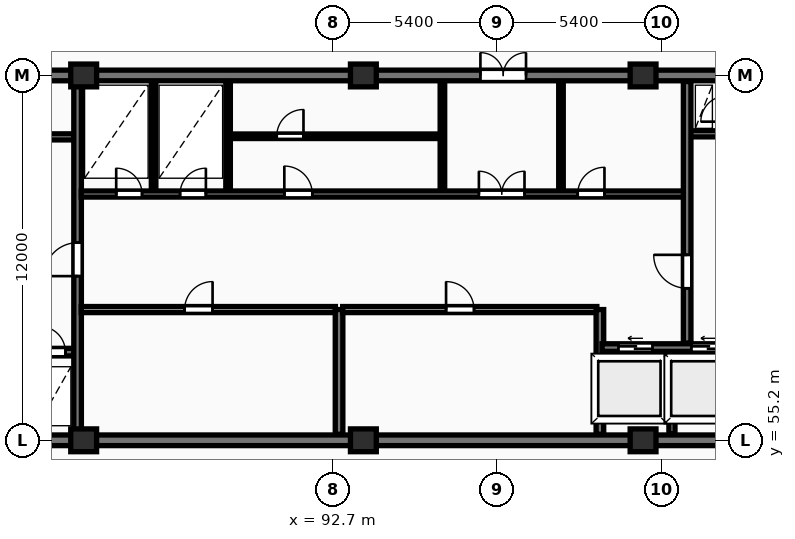
"""IFC4 building model, lengths in metres.
Left out: names, types, materials, properties, quantities, classifications, styles, units other than length and angle.
Written with IfcOpenShell. Run it as: python <this file> out.ifc"""

import sys

from ifc_helpers import new_model, si_unit, direction, frame, frame_2d, origin, origin_2d, place, context, subcontext, project, spatial, rectangle, extrude, element, fill, save


model = new_model("IFC4")
c1 = context("Model", 3, precision=1e-05, world=origin(), true_north=direction((0.0, 1.0)))
c2 = subcontext(c1, "Body", "Model", "MODEL_VIEW")
j1 = project(units=[si_unit("LENGTHUNIT", "METRE"), si_unit("PLANEANGLEUNIT", "RADIAN")], contexts=[c1])
p1 = place(None, origin())
s1 = spatial("IfcSite", under=j1, at=p1, CompositionType="ELEMENT")
p2 = place(p1, origin())
s2 = spatial("IfcBuilding", under=s1, at=p2, CompositionType="ELEMENT")
p3 = place(p2, frame((0.0, 0.0, 204.35)))
s3 = spatial("IfcBuildingStorey", under=s2, at=p3, CompositionType="ELEMENT", Elevation=204.35)
for number, where, z_axis, x_axis in (
    (1, (84.5, 55.2, 0.0), (0.0, 0.0, 1.0), (1.0, 0.0, 0.0)),
    (2, (84.5, 67.2, 0.0), (0.0, 0.0, 1.0), (1.0, 0.0, 0.0)),
    (3, (93.7, 55.2, 0.0), (0.0, 0.0, 1.0), (1.0, 0.0, 0.0)),
    (4, (93.7, 67.2, 0.0), (0.0, 0.0, 1.0), (1.0, 0.0, 0.0)),
    (5, (102.9, 55.2, 0.0), (0.0, 0.0, 1.0), (1.0, 0.0, 0.0)),
    (6, (102.9, 67.2, 0.0), (0.0, 0.0, 1.0), (1.0, 0.0, 0.0)),
):
    element("IfcColumn", number, at=place(p3, frame(where, z_axis=z_axis, x_axis=x_axis)), inside=s3, PredefinedType="COLUMN", context=c2, shape_type="SweptSolid", body=[
        extrude(rectangle(XDim=0.85, YDim=0.75, at=origin_2d()), origin(), (0.0, 0.0, 1.0), 3.25),
    ])
p4 = place(p3, frame((75.95, 55.2, 0.0), z_axis=(0.0, 0.0, 1.0), x_axis=(1.0, 0.0, 0.0)))
e7 = element("IfcWall", 7, at=p4, inside=s3, PredefinedType="SHEAR", context=c2, shape_type="SweptSolid", body=[
    extrude(rectangle(XDim=36.3, YDim=0.35, at=frame_2d((18.15, 0.0))), origin(), (0.0, 0.0, 1.0), 3.25),
])
p5 = place(p3, frame((75.95, 67.2, 0.0), z_axis=(0.0, 0.0, 1.0), x_axis=(1.0, 0.0, 0.0)))
e8 = element("IfcWall", 8, at=p5, inside=s3, PredefinedType="SHEAR", context=c2, shape_type="SweptSolid", body=[
    extrude(rectangle(XDim=36.3, YDim=0.35, at=frame_2d((18.15, 0.0))), origin(), (0.0, 0.0, 1.0), 3.25),
])
p6 = place(p5, frame((5.25, 0.0, 0.0)))
e9 = element("IfcOpeningElement", 9, at=p6, cuts=e8, PredefinedType="OPENING", context=c2, shape_type="SweptSolid", body=[
    extrude(rectangle(XDim=1.0, YDim=2.15, at=frame_2d((0.5, 1.075))), frame((0.0, 0.185, 0.0), z_axis=(0.0, -1.0, 0.0), x_axis=(1.0, 0.0, 0.0)), (0.0, 0.0, 1.0), 0.37),
])
p7 = place(p5, frame((21.6, 0.0, 0.0)))
e10 = element("IfcOpeningElement", 10, at=p7, cuts=e8, PredefinedType="OPENING", context=c2, shape_type="SweptSolid", body=[
    extrude(rectangle(XDim=1.5, YDim=2.2, at=frame_2d((0.75, 1.1))), frame((0.0, 0.185, 0.0), z_axis=(0.0, -1.0, 0.0), x_axis=(1.0, 0.0, 0.0)), (0.0, 0.0, 1.0), 0.37),
])
p8 = place(p5, frame((30.45, 0.0, 0.0)))
e11 = element("IfcOpeningElement", 11, at=p8, cuts=e8, PredefinedType="OPENING", context=c2, shape_type="SweptSolid", body=[
    extrude(rectangle(XDim=1.0, YDim=2.15, at=frame_2d((0.5, 1.075))), frame((0.0, 0.185, 0.0), z_axis=(0.0, -1.0, 0.0), x_axis=(1.0, 0.0, 0.0)), (0.0, 0.0, 1.0), 0.37),
])
p9 = place(p3, frame((79.79, 58.1, 0.0), z_axis=(0.0, 0.0, 1.0), x_axis=(1.0, 0.0, 0.0)))
e12 = element("IfcWall", 12, at=p9, inside=s3, PredefinedType="SHEAR", context=c2, shape_type="SweptSolid", body=[
    extrude(rectangle(XDim=4.39, YDim=0.25, at=frame_2d((2.195, 0.0))), origin(), (0.0, 0.0, 1.0), 3.25),
])
p10 = place(p9, frame((1.05, 0.0, 0.0)))
e13 = element("IfcOpeningElement", 13, at=p10, cuts=e12, PredefinedType="OPENING", context=c2, shape_type="SweptSolid", body=[
    extrude(rectangle(XDim=1.12, YDim=2.12, at=frame_2d((0.56, 1.06))), frame((0.0, 0.135, 0.0), z_axis=(0.0, -1.0, 0.0), x_axis=(1.0, 0.0, 0.0)), (0.0, 0.0, 1.0), 0.27),
])
p11 = place(p9, frame((3.26, 0.0, 0.0)))
e14 = element("IfcOpeningElement", 14, at=p11, cuts=e12, PredefinedType="OPENING", context=c2, shape_type="SweptSolid", body=[
    extrude(rectangle(XDim=0.85, YDim=2.05, at=frame_2d((0.425, 1.025))), frame((0.0, 0.135, 0.0), z_axis=(0.0, -1.0, 0.0), x_axis=(1.0, 0.0, 0.0)), (0.0, 0.0, 1.0), 0.27),
])
p12 = place(p3, frame((79.79, 65.18, 0.0), z_axis=(0.0, 0.0, 1.0), x_axis=(1.0, 0.0, 0.0)))
e15 = element("IfcWall", 15, at=p12, inside=s3, PredefinedType="PARTITIONING", context=c2, shape_type="SweptSolid", body=[
    extrude(rectangle(XDim=4.39, YDim=0.2, at=frame_2d((2.195, 0.0))), origin(), (0.0, 0.0, 1.0), 2.98),
])
p13 = place(p12, frame((1.5, 0.0, 0.0)))
e16 = element("IfcOpeningElement", 16, at=p13, cuts=e15, PredefinedType="OPENING", context=c2, shape_type="SweptSolid", body=[
    extrude(rectangle(XDim=1.1, YDim=2.1, at=frame_2d((0.55, 1.05))), frame((0.0, 0.11, 0.0), z_axis=(0.0, -1.0, 0.0), x_axis=(1.0, 0.0, 0.0)), (0.0, 0.0, 1.0), 0.22),
])
p14 = place(p3, frame((84.3, 55.4, 0.0), z_axis=(0.0, 0.0, 1.0), x_axis=(0.0, 1.0, 0.0)))
e17 = element("IfcWall", 17, at=p14, inside=s3, PredefinedType="SHEAR", context=c2, shape_type="SweptSolid", body=[
    extrude(rectangle(XDim=11.6, YDim=0.25, at=frame_2d((5.8, 0.0))), origin(), (0.0, 0.0, 1.0), 3.25),
])
p15 = place(p14, frame((5.2, 0.0, 0.0)))
e18 = element("IfcOpeningElement", 18, at=p15, cuts=e17, PredefinedType="OPENING", context=c2, shape_type="SweptSolid", body=[
    extrude(rectangle(XDim=1.1, YDim=2.1, at=frame_2d((0.55, 1.05))), frame((0.0, 0.135, 0.0), z_axis=(0.0, -1.0, 0.0), x_axis=(1.0, 0.0, 0.0)), (0.0, 0.0, 1.0), 0.27),
])
p16 = place(p3, frame((84.42, 59.5, 0.0), z_axis=(0.0, 0.0, 1.0), x_axis=(1.0, 0.0, 0.0)))
e19 = element("IfcWall", 19, at=p16, inside=s3, PredefinedType="PARTITIONING", context=c2, shape_type="SweptSolid", body=[
    extrude(rectangle(XDim=8.36, YDim=0.2, at=frame_2d((4.18, 0.0))), origin(), (0.0, 0.0, 1.0), 2.98),
])
p17 = place(p16, frame((3.4, 0.0, 0.0)))
e20 = element("IfcOpeningElement", 20, at=p17, cuts=e19, PredefinedType="OPENING", context=c2, shape_type="SweptSolid", body=[
    extrude(rectangle(XDim=0.92, YDim=2.08, at=frame_2d((0.46, 1.04))), frame((0.0, 0.11, 0.0), z_axis=(0.0, -1.0, 0.0), x_axis=(1.0, 0.0, 0.0)), (0.0, 0.0, 1.0), 0.22),
])
p18 = place(p3, frame((92.9, 55.4, 0.0), z_axis=(0.0, 0.0, 1.0), x_axis=(0.0, 1.0, 0.0)))
e21 = element("IfcWall", 21, at=p18, inside=s3, PredefinedType="SHEAR", context=c2, shape_type="SweptSolid", body=[
    extrude(rectangle(XDim=4.1, YDim=0.25, at=frame_2d((2.05, 0.0))), origin(), (0.0, 0.0, 1.0), 3.25),
])
p19 = place(p3, frame((93.02, 59.5, 0.0), z_axis=(0.0, 0.0, 1.0), x_axis=(1.0, 0.0, 0.0)))
e22 = element("IfcWall", 22, at=p19, inside=s3, PredefinedType="PARTITIONING", context=c2, shape_type="SweptSolid", body=[
    extrude(rectangle(XDim=8.36, YDim=0.2, at=frame_2d((4.18, 0.0))), origin(), (0.0, 0.0, 1.0), 2.98),
])
p20 = place(p19, frame((3.4, 0.0, 0.0)))
e23 = element("IfcOpeningElement", 23, at=p20, cuts=e22, PredefinedType="OPENING", context=c2, shape_type="SweptSolid", body=[
    extrude(rectangle(XDim=0.92, YDim=2.08, at=frame_2d((0.46, 1.04))), frame((0.0, 0.11, 0.0), z_axis=(0.0, -1.0, 0.0), x_axis=(1.0, 0.0, 0.0)), (0.0, 0.0, 1.0), 0.22),
])
p21 = place(p3, frame((101.48, 55.4, 0.0), z_axis=(0.0, 0.0, 1.0), x_axis=(0.0, 1.0, 0.0)))
e24 = element("IfcWall", 24, at=p21, inside=s3, PredefinedType="SHEAR", context=c2, shape_type="SweptSolid", body=[
    extrude(rectangle(XDim=4.1, YDim=0.25, at=frame_2d((2.05, 0.0))), origin(), (0.0, 0.0, 1.0), 3.25),
])
p22 = place(p3, frame((103.85, 55.4, 0.0), z_axis=(0.0, 0.0, 1.0), x_axis=(0.0, 1.0, 0.0)))
e25 = element("IfcWall", 25, at=p22, inside=s3, PredefinedType="PARTITIONING", context=c2, shape_type="SweptSolid", body=[
    extrude(rectangle(XDim=2.72, YDim=0.2, at=frame_2d((1.36, 0.0))), origin(), (0.0, 0.0, 1.0), 2.98),
])
p23 = place(p3, frame((101.55, 58.25, 0.0), z_axis=(0.0, 0.0, 1.0), x_axis=(1.0, 0.0, 0.0)))
e26 = element("IfcWall", 26, at=p23, inside=s3, PredefinedType="SHEAR", context=c2, shape_type="SweptSolid", body=[
    extrude(rectangle(XDim=4.6, YDim=0.25, at=frame_2d((2.3, 0.0))), origin(), (0.0, 0.0, 1.0), 3.25),
])
p24 = place(p23, frame((0.54, 0.0, 0.0)))
e27 = element("IfcOpeningElement", 27, at=p24, cuts=e26, PredefinedType="OPENING", context=c2, shape_type="SweptSolid", body=[
    extrude(rectangle(XDim=1.12, YDim=2.12, at=frame_2d((0.56, 1.06))), frame((0.0, 0.135, 0.0), z_axis=(0.0, -1.0, 0.0), x_axis=(1.0, 0.0, 0.0)), (0.0, 0.0, 1.0), 0.27),
])
p25 = place(p23, frame((2.94, 0.0, 0.0)))
e28 = element("IfcOpeningElement", 28, at=p25, cuts=e26, PredefinedType="OPENING", context=c2, shape_type="SweptSolid", body=[
    extrude(rectangle(XDim=1.12, YDim=2.12, at=frame_2d((0.56, 1.06))), frame((0.0, 0.135, 0.0), z_axis=(0.0, -1.0, 0.0), x_axis=(1.0, 0.0, 0.0)), (0.0, 0.0, 1.0), 0.27),
])
for number, where, z_axis, x_axis in (
    (29, (86.8, 63.4, 0.0), (0.0, 0.0, 1.0), (0.0, 1.0, 0.0)),
    (30, (89.25, 63.4, 0.0), (0.0, 0.0, 1.0), (0.0, 1.0, 0.0)),
):
    element("IfcWall", number, at=place(p3, frame(where, z_axis=z_axis, x_axis=x_axis)), inside=s3, PredefinedType="PARTITIONING", context=c2, shape_type="SweptSolid", body=[
        extrude(rectangle(XDim=3.6, YDim=0.15, at=frame_2d((1.8, 0.0))), origin(), (0.0, 0.0, 1.0), 2.98),
    ])
p26 = place(p3, frame((89.25, 65.2, 0.0), z_axis=(0.0, 0.0, 1.0), x_axis=(1.0, 0.0, 0.0)))
e31 = element("IfcWall", 31, at=p26, inside=s3, PredefinedType="PARTITIONING", context=c2, shape_type="SweptSolid", body=[
    extrude(rectangle(XDim=7.05, YDim=0.15, at=frame_2d((3.525, 0.0))), origin(), (0.0, 0.0, 1.0), 2.98),
])
p27 = place(p26, frame((1.6, 0.0, 0.0)))
e32 = element("IfcOpeningElement", 32, at=p27, cuts=e31, PredefinedType="OPENING", context=c2, shape_type="SweptSolid", body=[
    extrude(rectangle(XDim=0.88, YDim=2.06, at=frame_2d((0.44, 1.03))), frame((0.0, 0.085, 0.0), z_axis=(0.0, -1.0, 0.0), x_axis=(1.0, 0.0, 0.0)), (0.0, 0.0, 1.0), 0.17),
])
for number, where, z_axis, x_axis in (
    (33, (96.3, 63.4, 0.0), (0.0, 0.0, 1.0), (0.0, 1.0, 0.0)),
    (34, (100.2, 63.4, 0.0), (0.0, 0.0, 1.0), (0.0, 1.0, 0.0)),
):
    element("IfcWall", number, at=place(p3, frame(where, z_axis=z_axis, x_axis=x_axis)), inside=s3, PredefinedType="PARTITIONING", context=c2, shape_type="SweptSolid", body=[
        extrude(rectangle(XDim=3.6, YDim=0.15, at=frame_2d((1.8, 0.0))), origin(), (0.0, 0.0, 1.0), 2.98),
    ])
p28 = place(p3, frame((84.42, 63.3, 0.0), z_axis=(0.0, 0.0, 1.0), x_axis=(1.0, 0.0, 0.0)))
e35 = element("IfcWall", 35, at=p28, inside=s3, PredefinedType="PARTITIONING", context=c2, shape_type="SweptSolid", body=[
    extrude(rectangle(XDim=19.83, YDim=0.2, at=frame_2d((9.915, 0.0))), origin(), (0.0, 0.0, 1.0), 2.98),
])
p29 = place(p28, frame((1.15, 0.0, 0.0)))
e36 = element("IfcOpeningElement", 36, at=p29, cuts=e35, PredefinedType="OPENING", context=c2, shape_type="SweptSolid", body=[
    extrude(rectangle(XDim=0.85, YDim=2.05, at=frame_2d((0.425, 1.025))), frame((0.0, 0.11, 0.0), z_axis=(0.0, -1.0, 0.0), x_axis=(1.0, 0.0, 0.0)), (0.0, 0.0, 1.0), 0.22),
])
p30 = place(p28, frame((3.25, 0.0, 0.0)))
e37 = element("IfcOpeningElement", 37, at=p30, cuts=e35, PredefinedType="OPENING", context=c2, shape_type="SweptSolid", body=[
    extrude(rectangle(XDim=0.85, YDim=2.05, at=frame_2d((0.425, 1.025))), frame((0.0, 0.11, 0.0), z_axis=(0.0, -1.0, 0.0), x_axis=(1.0, 0.0, 0.0)), (0.0, 0.0, 1.0), 0.22),
])
p31 = place(p28, frame((13.08, 0.0, 0.0)))
e38 = element("IfcOpeningElement", 38, at=p31, cuts=e35, PredefinedType="OPENING", context=c2, shape_type="SweptSolid", body=[
    extrude(rectangle(XDim=1.5, YDim=2.2, at=frame_2d((0.75, 1.1))), frame((0.0, 0.11, 0.0), z_axis=(0.0, -1.0, 0.0), x_axis=(1.0, 0.0, 0.0)), (0.0, 0.0, 1.0), 0.22),
])
p32 = place(p28, frame((6.68, 0.0, 0.0)))
e39 = element("IfcOpeningElement", 39, at=p32, cuts=e35, PredefinedType="OPENING", context=c2, shape_type="SweptSolid", body=[
    extrude(rectangle(XDim=0.92, YDim=2.08, at=frame_2d((0.46, 1.04))), frame((0.0, 0.11, 0.0), z_axis=(0.0, -1.0, 0.0), x_axis=(1.0, 0.0, 0.0)), (0.0, 0.0, 1.0), 0.22),
])
p33 = place(p28, frame((16.33, 0.0, 0.0)))
e40 = element("IfcOpeningElement", 40, at=p33, cuts=e35, PredefinedType="OPENING", context=c2, shape_type="SweptSolid", body=[
    extrude(rectangle(XDim=0.88, YDim=2.06, at=frame_2d((0.44, 1.03))), frame((0.0, 0.11, 0.0), z_axis=(0.0, -1.0, 0.0), x_axis=(1.0, 0.0, 0.0)), (0.0, 0.0, 1.0), 0.22),
])
p34 = place(p3, frame((104.45, 65.28, 0.0), z_axis=(0.0, 0.0, 1.0), x_axis=(1.0, 0.0, 0.0)))
e41 = element("IfcWall", 41, at=p34, inside=s3, PredefinedType="PARTITIONING", context=c2, shape_type="SweptSolid", body=[
    extrude(rectangle(XDim=1.2, YDim=0.2, at=frame_2d((0.6, 0.0))), origin(), (0.0, 0.0, 1.0), 2.98),
])
p35 = place(p3, frame((104.35, 58.4, 0.0), z_axis=(0.0, 0.0, 1.0), x_axis=(0.0, 1.0, 0.0)))
e42 = element("IfcWall", 42, at=p35, inside=s3, PredefinedType="SHEAR", context=c2, shape_type="SweptSolid", body=[
    extrude(rectangle(XDim=8.6, YDim=0.25, at=frame_2d((4.3, 0.0))), origin(), (0.0, 0.0, 1.0), 3.25),
])
p36 = place(p35, frame((1.8, 0.0, 0.0)))
e43 = element("IfcOpeningElement", 43, at=p36, cuts=e42, PredefinedType="OPENING", context=c2, shape_type="SweptSolid", body=[
    extrude(rectangle(XDim=1.1, YDim=2.1, at=frame_2d((0.55, 1.05))), frame((0.0, 0.135, 0.0), z_axis=(0.0, -1.0, 0.0), x_axis=(1.0, 0.0, 0.0)), (0.0, 0.0, 1.0), 0.27),
])
p37 = place(p7, origin())
e44 = element("IfcDoor", 44, at=p37, inside=s3, OperationType="DOUBLE_DOOR_SINGLE_SWING", PredefinedType="DOOR", context=c2, shape_type="SweptSolid", body=[
    extrude(rectangle(XDim=1.5, YDim=2.2, at=frame_2d((0.75, 1.1))), frame((0.0, 0.025, 0.0), z_axis=(0.0, -1.0, 0.0), x_axis=(1.0, 0.0, 0.0)), (0.0, 0.0, 1.0), 0.05),
])
fill(e10, e44)
p38 = place(p11, origin())
e45 = element("IfcDoor", 45, at=p38, inside=s3, OperationType="SINGLE_SWING_LEFT", PredefinedType="DOOR", context=c2, shape_type="SweptSolid", body=[
    extrude(rectangle(XDim=0.85, YDim=2.05, at=frame_2d((0.425, 1.025))), frame((0.0, 0.025, 0.0), z_axis=(0.0, -1.0, 0.0), x_axis=(1.0, 0.0, 0.0)), (0.0, 0.0, 1.0), 0.05),
])
fill(e14, e45)
p39 = place(p15, origin())
e46 = element("IfcDoor", 46, at=p39, inside=s3, OperationType="SINGLE_SWING_LEFT", PredefinedType="DOOR", context=c2, shape_type="SweptSolid", body=[
    extrude(rectangle(XDim=1.1, YDim=2.1, at=frame_2d((0.55, 1.05))), frame((0.0, 0.025, 0.0), z_axis=(0.0, -1.0, 0.0), x_axis=(1.0, 0.0, 0.0)), (0.0, 0.0, 1.0), 0.05),
])
fill(e18, e46)
p40 = place(p17, origin())
e47 = element("IfcDoor", 47, at=p40, inside=s3, OperationType="SINGLE_SWING_RIGHT", PredefinedType="DOOR", context=c2, shape_type="SweptSolid", body=[
    extrude(rectangle(XDim=0.92, YDim=2.08, at=frame_2d((0.46, 1.04))), frame((0.0, 0.025, 0.0), z_axis=(0.0, -1.0, 0.0), x_axis=(1.0, 0.0, 0.0)), (0.0, 0.0, 1.0), 0.05),
])
fill(e20, e47)
p41 = place(p20, origin())
e48 = element("IfcDoor", 48, at=p41, inside=s3, OperationType="SINGLE_SWING_LEFT", PredefinedType="DOOR", context=c2, shape_type="SweptSolid", body=[
    extrude(rectangle(XDim=0.92, YDim=2.08, at=frame_2d((0.46, 1.04))), frame((0.0, 0.025, 0.0), z_axis=(0.0, -1.0, 0.0), x_axis=(1.0, 0.0, 0.0)), (0.0, 0.0, 1.0), 0.05),
])
fill(e23, e48)
p42 = place(p24, origin())
e49 = element("IfcDoor", 49, at=p42, inside=s3, OperationType="SLIDING_TO_LEFT", PredefinedType="DOOR", context=c2, shape_type="SweptSolid", body=[
    extrude(rectangle(XDim=1.12, YDim=2.12, at=frame_2d((0.56, 1.06))), frame((0.0, 0.025, 0.0), z_axis=(0.0, -1.0, 0.0), x_axis=(1.0, 0.0, 0.0)), (0.0, 0.0, 1.0), 0.05),
])
fill(e27, e49)
p43 = place(p25, origin())
e50 = element("IfcDoor", 50, at=p43, inside=s3, OperationType="SLIDING_TO_LEFT", PredefinedType="DOOR", context=c2, shape_type="SweptSolid", body=[
    extrude(rectangle(XDim=1.12, YDim=2.12, at=frame_2d((0.56, 1.06))), frame((0.0, 0.025, 0.0), z_axis=(0.0, -1.0, 0.0), x_axis=(1.0, 0.0, 0.0)), (0.0, 0.0, 1.0), 0.05),
])
fill(e28, e50)
p44 = place(p27, origin())
e51 = element("IfcDoor", 51, at=p44, inside=s3, OperationType="SINGLE_SWING_RIGHT", PredefinedType="DOOR", context=c2, shape_type="SweptSolid", body=[
    extrude(rectangle(XDim=0.88, YDim=2.06, at=frame_2d((0.44, 1.03))), frame((0.0, 0.025, 0.0), z_axis=(0.0, -1.0, 0.0), x_axis=(1.0, 0.0, 0.0)), (0.0, 0.0, 1.0), 0.05),
])
fill(e32, e51)
p45 = place(p29, origin())
e52 = element("IfcDoor", 52, at=p45, inside=s3, OperationType="SINGLE_SWING_LEFT", PredefinedType="DOOR", context=c2, shape_type="SweptSolid", body=[
    extrude(rectangle(XDim=0.85, YDim=2.05, at=frame_2d((0.425, 1.025))), frame((0.0, 0.025, 0.0), z_axis=(0.0, -1.0, 0.0), x_axis=(1.0, 0.0, 0.0)), (0.0, 0.0, 1.0), 0.05),
])
fill(e36, e52)
p46 = place(p30, origin())
e53 = element("IfcDoor", 53, at=p46, inside=s3, OperationType="SINGLE_SWING_RIGHT", PredefinedType="DOOR", context=c2, shape_type="SweptSolid", body=[
    extrude(rectangle(XDim=0.85, YDim=2.05, at=frame_2d((0.425, 1.025))), frame((0.0, 0.025, 0.0), z_axis=(0.0, -1.0, 0.0), x_axis=(1.0, 0.0, 0.0)), (0.0, 0.0, 1.0), 0.05),
])
fill(e37, e53)
p47 = place(p31, origin())
e54 = element("IfcDoor", 54, at=p47, inside=s3, OperationType="DOUBLE_DOOR_SINGLE_SWING", PredefinedType="DOOR", context=c2, shape_type="SweptSolid", body=[
    extrude(rectangle(XDim=1.5, YDim=2.2, at=frame_2d((0.75, 1.1))), frame((0.0, 0.025, 0.0), z_axis=(0.0, -1.0, 0.0), x_axis=(1.0, 0.0, 0.0)), (0.0, 0.0, 1.0), 0.05),
])
fill(e38, e54)
p48 = place(p32, origin())
e55 = element("IfcDoor", 55, at=p48, inside=s3, OperationType="SINGLE_SWING_LEFT", PredefinedType="DOOR", context=c2, shape_type="SweptSolid", body=[
    extrude(rectangle(XDim=0.92, YDim=2.08, at=frame_2d((0.46, 1.04))), frame((0.0, 0.025, 0.0), z_axis=(0.0, -1.0, 0.0), x_axis=(1.0, 0.0, 0.0)), (0.0, 0.0, 1.0), 0.05),
])
fill(e39, e55)
p49 = place(p33, origin())
e56 = element("IfcDoor", 56, at=p49, inside=s3, OperationType="SINGLE_SWING_RIGHT", PredefinedType="DOOR", context=c2, shape_type="SweptSolid", body=[
    extrude(rectangle(XDim=0.88, YDim=2.06, at=frame_2d((0.44, 1.03))), frame((0.0, 0.025, 0.0), z_axis=(0.0, -1.0, 0.0), x_axis=(1.0, 0.0, 0.0)), (0.0, 0.0, 1.0), 0.05),
])
fill(e40, e56)
p50 = place(p36, origin())
e57 = element("IfcDoor", 57, at=p50, inside=s3, OperationType="SINGLE_SWING_RIGHT", PredefinedType="DOOR", context=c2, shape_type="SweptSolid", body=[
    extrude(rectangle(XDim=1.1, YDim=2.1, at=frame_2d((0.55, 1.05))), frame((0.0, 0.025, 0.0), z_axis=(0.0, -1.0, 0.0), x_axis=(1.0, 0.0, 0.0)), (0.0, 0.0, 1.0), 0.05),
])
fill(e43, e57)
save(model, sys.argv[1])
